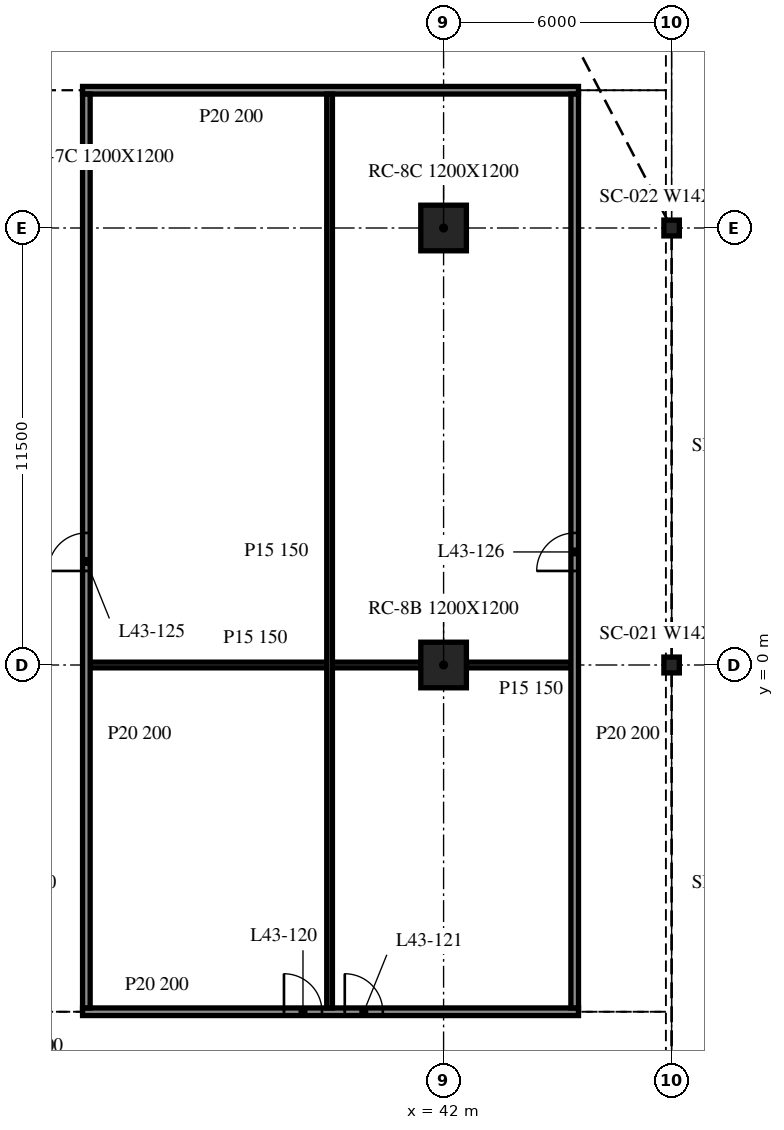
"""IFC4 building model, lengths in metres.
Left out: names, types, materials, properties, quantities, classifications, styles, units other than length and angle.
Written with IfcOpenShell. Run it as: python <this file> out.ifc"""

import sys

from ifc_helpers import new_model, si_unit, direction, frame, frame_2d, origin, origin_2d, place, context, subcontext, project, spatial, rectangle, i_section, extrude, element, fill, save


model = new_model("IFC4")
c1 = context("Model", 3, precision=1e-05, world=origin(), true_north=direction((0.0, 1.0)))
c2 = subcontext(c1, "Body", "Model", "MODEL_VIEW")
j1 = project(units=[si_unit("LENGTHUNIT", "METRE"), si_unit("PLANEANGLEUNIT", "RADIAN")], contexts=[c1])
p1 = place(None, origin())
s1 = spatial("IfcSite", under=j1, at=p1, CompositionType="ELEMENT")
p2 = place(p1, origin())
s2 = spatial("IfcBuilding", under=s1, at=p2, CompositionType="ELEMENT")
p3 = place(p2, frame((0.0, 0.0, 182.0)))
s3 = spatial("IfcBuildingStorey", under=s2, at=p3, CompositionType="ELEMENT", Elevation=182.0)
for number, where, z_axis, x_axis in (
    (1, (42.0, 0.0, -0.34), (0.0, 0.0, 1.0), (1.0, 0.0, 0.0)),
    (2, (42.0, 11.5, -0.34), (0.0, 0.0, 1.0), (1.0, 0.0, 0.0)),
):
    element("IfcColumn", number, at=place(p3, frame(where, z_axis=z_axis, x_axis=x_axis)), inside=s3, PredefinedType="COLUMN", context=c2, shape_type="SweptSolid", body=[
        extrude(rectangle(XDim=1.2, YDim=1.2, at=origin_2d()), origin(), (0.0, 0.0, 1.0), 3.8),
    ])
for number, where, z_axis, x_axis in (
    (3, (48.0, 0.0, -0.34), (0.0, 0.0, 1.0), (1.0, 0.0, 0.0)),
    (4, (48.0, 11.5, -0.34), (0.0, 0.0, 1.0), (1.0, 0.0, 0.0)),
):
    element("IfcColumn", number, at=place(p3, frame(where, z_axis=z_axis, x_axis=x_axis)), inside=s3, PredefinedType="COLUMN", context=c2, shape_type="SweptSolid", body=[
        extrude(i_section(OverallWidth=0.406, OverallDepth=0.417, WebThickness=0.03, FlangeThickness=0.048, at=origin_2d()), origin(), (0.0, 0.0, 1.0), 3.8),
    ])
p4 = place(p3, frame((32.5, -9.125, 0.0), z_axis=(0.0, 0.0, 1.0), x_axis=(1.0, 0.0, 0.0)))
e5 = element("IfcWall", 5, at=p4, inside=s3, PredefinedType="PARTITIONING", context=c2, shape_type="SweptSolid", body=[
    extrude(rectangle(XDim=13.05, YDim=0.2, at=frame_2d((6.525, 0.0))), origin(), (0.0, 0.0, 1.0), 3.46),
])
p5 = place(p4, frame((5.3, 0.0, 0.0)))
e6 = element("IfcOpeningElement", 6, at=p5, cuts=e5, PredefinedType="OPENING", context=c2, shape_type="SweptSolid", body=[
    extrude(rectangle(XDim=1.0, YDim=2.1, at=frame_2d((0.5, 1.05))), frame((0.0, 0.11, 0.0), z_axis=(0.0, -1.0, 0.0), x_axis=(1.0, 0.0, 0.0)), (0.0, 0.0, 1.0), 0.22),
])
p6 = place(p4, frame((6.9, 0.0, 0.0)))
e7 = element("IfcOpeningElement", 7, at=p6, cuts=e5, PredefinedType="OPENING", context=c2, shape_type="SweptSolid", body=[
    extrude(rectangle(XDim=1.0, YDim=2.1, at=frame_2d((0.5, 1.05))), frame((0.0, 0.11, 0.0), z_axis=(0.0, -1.0, 0.0), x_axis=(1.0, 0.0, 0.0)), (0.0, 0.0, 1.0), 0.22),
])
p7 = place(p3, frame((32.7, 0.0, 0.0), z_axis=(0.0, 0.0, 1.0), x_axis=(1.0, 0.0, 0.0)))
e8 = element("IfcWall", 8, at=p7, inside=s3, PredefinedType="PARTITIONING", context=c2, shape_type="SweptSolid", body=[
    extrude(rectangle(XDim=8.7, YDim=0.15, at=frame_2d((4.35, 0.0))), origin(), (0.0, 0.0, 1.0), 3.46),
])
p8 = place(p3, frame((42.6, 0.0, 0.0), z_axis=(0.0, 0.0, 1.0), x_axis=(1.0, 0.0, 0.0)))
e9 = element("IfcWall", 9, at=p8, inside=s3, PredefinedType="PARTITIONING", context=c2, shape_type="SweptSolid", body=[
    extrude(rectangle(XDim=2.75, YDim=0.15, at=frame_2d((1.375, 0.0))), origin(), (0.0, 0.0, 1.0), 3.46),
])
p9 = place(p3, frame((32.5, 15.125, 0.0), z_axis=(0.0, 0.0, 1.0), x_axis=(1.0, 0.0, 0.0)))
e10 = element("IfcWall", 10, at=p9, inside=s3, PredefinedType="PARTITIONING", context=c2, shape_type="SweptSolid", body=[
    extrude(rectangle(XDim=13.05, YDim=0.2, at=frame_2d((6.525, 0.0))), origin(), (0.0, 0.0, 1.0), 3.46),
])
p10 = place(p3, frame((32.6, -9.025, 0.0), z_axis=(0.0, 0.0, 1.0), x_axis=(0.0, 1.0, 0.0)))
e11 = element("IfcWall", 11, at=p10, inside=s3, PredefinedType="PARTITIONING", context=c2, shape_type="SweptSolid", body=[
    extrude(rectangle(XDim=24.05, YDim=0.2, at=frame_2d((12.025, 0.0))), origin(), (0.0, 0.0, 1.0), 3.46),
])
p11 = place(p10, frame((11.5, 0.0, 0.0)))
e12 = element("IfcOpeningElement", 12, at=p11, cuts=e11, PredefinedType="OPENING", context=c2, shape_type="SweptSolid", body=[
    extrude(rectangle(XDim=1.0, YDim=2.1, at=frame_2d((0.5, 1.05))), frame((0.0, 0.11, 0.0), z_axis=(0.0, -1.0, 0.0), x_axis=(1.0, 0.0, 0.0)), (0.0, 0.0, 1.0), 0.22),
])
p12 = place(p3, frame((39.0, -9.025, 0.0), z_axis=(0.0, 0.0, 1.0), x_axis=(0.0, 1.0, 0.0)))
e13 = element("IfcWall", 13, at=p12, inside=s3, PredefinedType="PARTITIONING", context=c2, shape_type="SweptSolid", body=[
    extrude(rectangle(XDim=24.05, YDim=0.15, at=frame_2d((12.025, 0.0))), origin(), (0.0, 0.0, 1.0), 3.46),
])
p13 = place(p3, frame((45.45, -9.025, 0.0), z_axis=(0.0, 0.0, 1.0), x_axis=(0.0, 1.0, 0.0)))
e14 = element("IfcWall", 14, at=p13, inside=s3, PredefinedType="PARTITIONING", context=c2, shape_type="SweptSolid", body=[
    extrude(rectangle(XDim=24.05, YDim=0.2, at=frame_2d((12.025, 0.0))), origin(), (0.0, 0.0, 1.0), 3.46),
])
p14 = place(p13, frame((11.5, 0.0, 0.0)))
e15 = element("IfcOpeningElement", 15, at=p14, cuts=e14, PredefinedType="OPENING", context=c2, shape_type="SweptSolid", body=[
    extrude(rectangle(XDim=1.0, YDim=2.1, at=frame_2d((0.5, 1.05))), frame((0.0, 0.11, 0.0), z_axis=(0.0, -1.0, 0.0), x_axis=(1.0, 0.0, 0.0)), (0.0, 0.0, 1.0), 0.22),
])
p15 = place(p5, origin())
e16 = element("IfcDoor", 16, at=p15, inside=s3, OperationType="SINGLE_SWING_LEFT", PredefinedType="DOOR", context=c2, shape_type="SweptSolid", body=[
    extrude(rectangle(XDim=1.0, YDim=2.1, at=frame_2d((0.5, 1.05))), frame((0.0, 0.025, 0.0), z_axis=(0.0, -1.0, 0.0), x_axis=(1.0, 0.0, 0.0)), (0.0, 0.0, 1.0), 0.05),
])
fill(e6, e16)
p16 = place(p6, origin())
e17 = element("IfcDoor", 17, at=p16, inside=s3, OperationType="SINGLE_SWING_RIGHT", PredefinedType="DOOR", context=c2, shape_type="SweptSolid", body=[
    extrude(rectangle(XDim=1.0, YDim=2.1, at=frame_2d((0.5, 1.05))), frame((0.0, 0.025, 0.0), z_axis=(0.0, -1.0, 0.0), x_axis=(1.0, 0.0, 0.0)), (0.0, 0.0, 1.0), 0.05),
])
fill(e7, e17)
p17 = place(p11, origin())
e18 = element("IfcDoor", 18, at=p17, inside=s3, OperationType="SINGLE_SWING_RIGHT", PredefinedType="DOOR", context=c2, shape_type="SweptSolid", body=[
    extrude(rectangle(XDim=1.0, YDim=2.1, at=frame_2d((0.5, 1.05))), frame((0.0, 0.025, 0.0), z_axis=(0.0, -1.0, 0.0), x_axis=(1.0, 0.0, 0.0)), (0.0, 0.0, 1.0), 0.05),
])
fill(e12, e18)
p18 = place(p14, origin())
e19 = element("IfcDoor", 19, at=p18, inside=s3, OperationType="SINGLE_SWING_LEFT", PredefinedType="DOOR", context=c2, shape_type="SweptSolid", body=[
    extrude(rectangle(XDim=1.0, YDim=2.1, at=frame_2d((0.5, 1.05))), frame((0.0, 0.025, 0.0), z_axis=(0.0, -1.0, 0.0), x_axis=(1.0, 0.0, 0.0)), (0.0, 0.0, 1.0), 0.05),
])
fill(e15, e19)
save(model, sys.argv[1])
